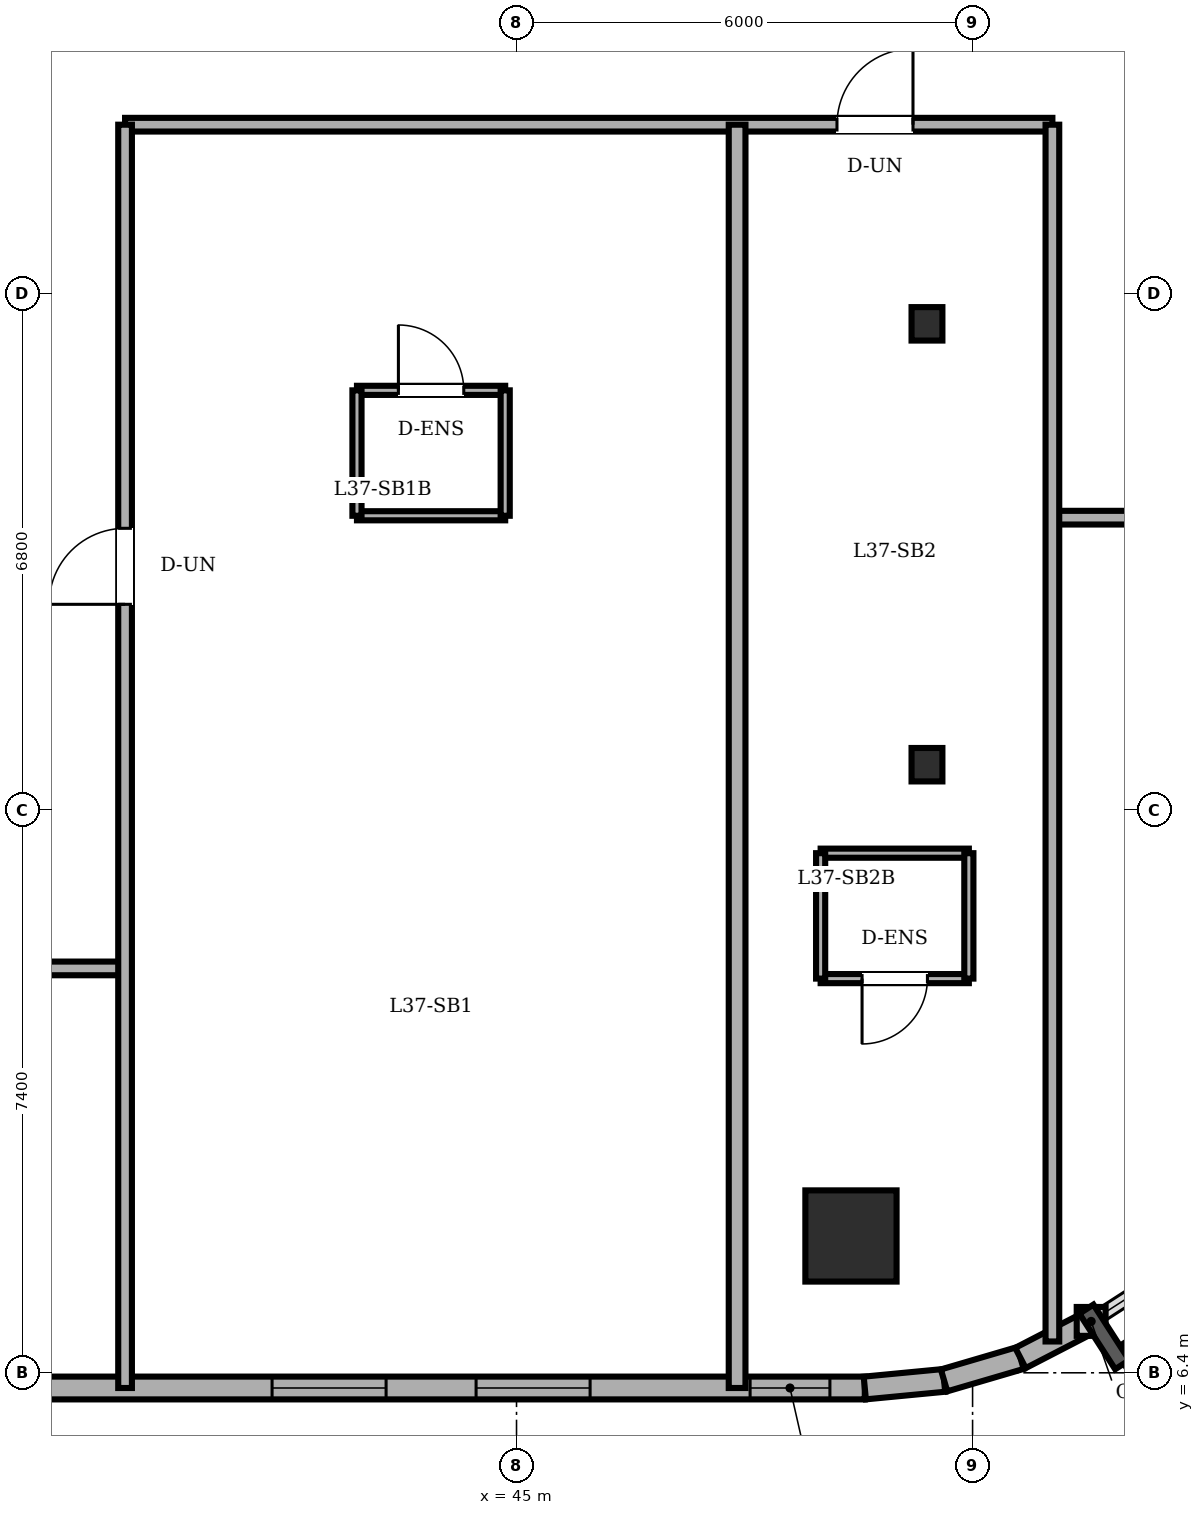
"""IFC4 building model, lengths in metres.
Left out: names, types, materials, properties, quantities, classifications, styles, units other than length and angle.
Written with IfcOpenShell. Run it as: python <this file> out.ifc"""

import sys

from ifc_helpers import new_model, si_unit, direction, frame, frame_2d, origin, origin_2d, place, context, subcontext, project, spatial, rectangle, circle, i_section, extrude, element, fill, save


model = new_model("IFC4")
c1 = context("Model", 3, precision=1e-05, world=origin(), true_north=direction((0.0, 1.0)))
c2 = subcontext(c1, "Body", "Model", "MODEL_VIEW")
j1 = project(units=[si_unit("LENGTHUNIT", "METRE"), si_unit("PLANEANGLEUNIT", "RADIAN")], contexts=[c1])
p1 = place(None, origin())
s1 = spatial("IfcSite", under=j1, at=p1, CompositionType="ELEMENT")
p2 = place(p1, origin())
s2 = spatial("IfcBuilding", under=s1, at=p2, CompositionType="ELEMENT")
p3 = place(p2, frame((0.0, 0.0, 143.8)))
s3 = spatial("IfcBuildingStorey", under=s2, at=p3, CompositionType="ELEMENT", Elevation=143.8)
p4 = place(p3, frame((49.4, 8.2, 0.0), z_axis=(0.0, 0.0, 1.0), x_axis=(1.0, 0.0, 0.0)))
e1 = element("IfcColumn", 1, at=p4, inside=s3, PredefinedType="COLUMN", context=c2, shape_type="SweptSolid", body=[
    extrude(circle(Radius=0.6, at=origin_2d()), origin(), (0.0, 0.0, 1.0), 3.6),
])
for number, where, z_axis, x_axis in (
    (2, (50.4, 14.4, 0.0), (0.0, 0.0, 1.0), (1.0, 0.0, 0.0)),
    (3, (50.4, 20.2, 0.0), (0.0, 0.0, 1.0), (1.0, 0.0, 0.0)),
):
    element("IfcColumn", number, at=place(p3, frame(where, z_axis=z_axis, x_axis=x_axis)), inside=s3, PredefinedType="COLUMN", context=c2, shape_type="SweptSolid", body=[
        extrude(i_section(OverallWidth=0.406, OverallDepth=0.44, WebThickness=0.024, FlangeThickness=0.039, FilletRadius=0.015, at=origin_2d()), origin(), (0.0, 0.0, 1.0), 3.6),
    ])
p5 = place(p3, frame((19.3, 6.2, 0.0), z_axis=(0.0, 0.0, 1.0), x_axis=(1.0, 0.0, 0.0)))
e4 = element("IfcWall", 4, at=p5, inside=s3, PredefinedType="SOLIDWALL", context=c2, shape_type="SweptSolid", body=[
    extrude(rectangle(XDim=30.282, YDim=0.3, at=frame_2d((15.141, 0.0))), origin(), (0.0, 0.0, 1.0), 3.4),
])
p6 = place(p5, frame((7.075, 0.0, 0.0)))
e5 = element("IfcOpeningElement", 5, at=p6, cuts=e4, PredefinedType="OPENING", context=c2, shape_type="SweptSolid", body=[
    extrude(rectangle(XDim=0.95, YDim=2.2, at=frame_2d((0.475, 1.1))), frame((0.0, 0.16, 0.0), z_axis=(0.0, -1.0, 0.0), x_axis=(1.0, 0.0, 0.0)), (0.0, 0.0, 1.0), 0.32),
])
p7 = place(p5, frame((1.25, 0.0, 0.85)))
e6 = element("IfcOpeningElement", 6, at=p7, cuts=e4, PredefinedType="OPENING", context=c2, shape_type="SweptSolid", body=[
    extrude(rectangle(XDim=1.5, YDim=1.55, at=frame_2d((0.75, 0.775))), frame((0.0, 0.16, 0.0), z_axis=(0.0, -1.0, 0.0), x_axis=(1.0, 0.0, 0.0)), (0.0, 0.0, 1.0), 0.32),
])
p8 = place(p5, frame((2.9, 0.0, 0.85)))
e7 = element("IfcOpeningElement", 7, at=p8, cuts=e4, PredefinedType="OPENING", context=c2, shape_type="SweptSolid", body=[
    extrude(rectangle(XDim=1.5, YDim=1.55, at=frame_2d((0.75, 0.775))), frame((0.0, 0.16, 0.0), z_axis=(0.0, -1.0, 0.0), x_axis=(1.0, 0.0, 0.0)), (0.0, 0.0, 1.0), 0.32),
])
p9 = place(p5, frame((12.167, 0.0, 0.85)))
e8 = element("IfcOpeningElement", 8, at=p9, cuts=e4, PredefinedType="OPENING", context=c2, shape_type="SweptSolid", body=[
    extrude(rectangle(XDim=1.5, YDim=1.55, at=frame_2d((0.75, 0.775))), frame((0.0, 0.16, 0.0), z_axis=(0.0, -1.0, 0.0), x_axis=(1.0, 0.0, 0.0)), (0.0, 0.0, 1.0), 0.32),
])
p10 = place(p5, frame((15.983, 0.0, 0.85)))
e9 = element("IfcOpeningElement", 9, at=p10, cuts=e4, PredefinedType="OPENING", context=c2, shape_type="SweptSolid", body=[
    extrude(rectangle(XDim=1.5, YDim=1.55, at=frame_2d((0.75, 0.775))), frame((0.0, 0.16, 0.0), z_axis=(0.0, -1.0, 0.0), x_axis=(1.0, 0.0, 0.0)), (0.0, 0.0, 1.0), 0.32),
])
p11 = place(p5, frame((22.484, 0.0, 0.85)))
e10 = element("IfcOpeningElement", 10, at=p11, cuts=e4, PredefinedType="OPENING", context=c2, shape_type="SweptSolid", body=[
    extrude(rectangle(XDim=1.5, YDim=1.55, at=frame_2d((0.75, 0.775))), frame((0.0, 0.16, 0.0), z_axis=(0.0, -1.0, 0.0), x_axis=(1.0, 0.0, 0.0)), (0.0, 0.0, 1.0), 0.32),
])
p12 = place(p5, frame((25.168, 0.0, 0.85)))
e11 = element("IfcOpeningElement", 11, at=p12, cuts=e4, PredefinedType="OPENING", context=c2, shape_type="SweptSolid", body=[
    extrude(rectangle(XDim=1.5, YDim=1.55, at=frame_2d((0.75, 0.775))), frame((0.0, 0.16, 0.0), z_axis=(0.0, -1.0, 0.0), x_axis=(1.0, 0.0, 0.0)), (0.0, 0.0, 1.0), 0.32),
])
p13 = place(p5, frame((28.773, 0.0, 0.85)))
e12 = element("IfcOpeningElement", 12, at=p13, cuts=e4, PredefinedType="OPENING", context=c2, shape_type="SweptSolid", body=[
    extrude(rectangle(XDim=1.05, YDim=1.55, at=frame_2d((0.525, 0.775))), frame((0.0, 0.16, 0.0), z_axis=(0.0, -1.0, 0.0), x_axis=(1.0, 0.0, 0.0)), (0.0, 0.0, 1.0), 0.32),
])
p14 = place(p3, frame((49.582, 6.2, 0.0), z_axis=(0.0, 0.0, 1.0), x_axis=(0.995426089968, 0.095534807324, 0.0)))
e13 = element("IfcWall", 13, at=p14, inside=s3, PredefinedType="SOLIDWALL", context=c2, shape_type="SweptSolid", body=[
    extrude(rectangle(XDim=1.048, YDim=0.3, at=frame_2d((0.524, 0.0))), origin(), (0.0, 0.0, 1.0), 3.4),
])
p15 = place(p3, frame((50.625, 6.3, 0.0), z_axis=(0.0, 0.0, 1.0), x_axis=(0.959528674476, 0.281610942363, 0.0)))
e14 = element("IfcWall", 14, at=p15, inside=s3, PredefinedType="SOLIDWALL", context=c2, shape_type="SweptSolid", body=[
    extrude(rectangle(XDim=1.047, YDim=0.3, at=frame_2d((0.524, 0.0))), origin(), (0.0, 0.0, 1.0), 3.4),
])
p16 = place(p3, frame((51.63, 6.595, 0.0), z_axis=(0.0, 0.0, 1.0), x_axis=(0.888283247196, 0.459296062198, 0.0)))
e15 = element("IfcWall", 15, at=p16, inside=s3, PredefinedType="SOLIDWALL", context=c2, shape_type="SweptSolid", body=[
    extrude(rectangle(XDim=1.047, YDim=0.3, at=frame_2d((0.523, 0.0))), origin(), (0.0, 0.0, 1.0), 3.4),
])
p17 = place(p3, frame((42.901, 19.325, 0.0), z_axis=(0.0, 0.0, 1.0), x_axis=(1.0, 0.0, 0.0)))
e16 = element("IfcWall", 16, at=p17, inside=s3, PredefinedType="PARTITIONING", context=c2, shape_type="SweptSolid", body=[
    extrude(rectangle(XDim=1.95, YDim=0.12, at=frame_2d((0.975, 0.0))), origin(), (0.0, 0.0, 1.0), 3.4),
])
p18 = place(p17, frame((0.545, 0.0, 0.0)))
e17 = element("IfcOpeningElement", 17, at=p18, cuts=e16, PredefinedType="OPENING", context=c2, shape_type="SweptSolid", body=[
    extrude(rectangle(XDim=0.86, YDim=2.1, at=frame_2d((0.43, 1.05))), frame((0.0, 0.07, 0.0), z_axis=(0.0, -1.0, 0.0), x_axis=(1.0, 0.0, 0.0)), (0.0, 0.0, 1.0), 0.14),
])
p19 = place(p3, frame((44.851, 17.675, 0.0), z_axis=(0.0, 0.0, 1.0), x_axis=(-1.0, 0.0, 0.0)))
e18 = element("IfcWall", 18, at=p19, inside=s3, PredefinedType="PARTITIONING", context=c2, shape_type="SweptSolid", body=[
    extrude(rectangle(XDim=1.95, YDim=0.12, at=frame_2d((0.975, 0.0))), origin(), (0.0, 0.0, 1.0), 3.4),
])
for number, where, z_axis, x_axis in (
    (19, (42.901, 19.325, 0.0), (0.0, 0.0, 1.0), (0.0, -1.0, 0.0)),
    (20, (44.851, 17.675, 0.0), (0.0, 0.0, 1.0), (0.0, 1.0, 0.0)),
):
    element("IfcWall", number, at=place(p3, frame(where, z_axis=z_axis, x_axis=x_axis)), inside=s3, PredefinedType="PARTITIONING", context=c2, shape_type="SweptSolid", body=[
        extrude(rectangle(XDim=1.65, YDim=0.12, at=frame_2d((0.825, 0.0))), origin(), (0.0, 0.0, 1.0), 3.4),
    ])
p20 = place(p3, frame((49.001, 13.236, 0.0), z_axis=(0.0, 0.0, 1.0), x_axis=(1.0, 0.0, 0.0)))
e21 = element("IfcWall", 21, at=p20, inside=s3, PredefinedType="PARTITIONING", context=c2, shape_type="SweptSolid", body=[
    extrude(rectangle(XDim=1.95, YDim=0.12, at=frame_2d((0.975, 0.0))), origin(), (0.0, 0.0, 1.0), 3.4),
])
p21 = place(p3, frame((50.951, 11.586, 0.0), z_axis=(0.0, 0.0, 1.0), x_axis=(-1.0, 0.0, 0.0)))
e22 = element("IfcWall", 22, at=p21, inside=s3, PredefinedType="PARTITIONING", context=c2, shape_type="SweptSolid", body=[
    extrude(rectangle(XDim=1.95, YDim=0.12, at=frame_2d((0.975, 0.0))), origin(), (0.0, 0.0, 1.0), 3.4),
])
p22 = place(p21, frame((0.545, 0.0, 0.0)))
e23 = element("IfcOpeningElement", 23, at=p22, cuts=e22, PredefinedType="OPENING", context=c2, shape_type="SweptSolid", body=[
    extrude(rectangle(XDim=0.86, YDim=2.1, at=frame_2d((0.43, 1.05))), frame((0.0, 0.07, 0.0), z_axis=(0.0, -1.0, 0.0), x_axis=(1.0, 0.0, 0.0)), (0.0, 0.0, 1.0), 0.14),
])
for number, where, z_axis, x_axis in (
    (24, (49.001, 13.236, 0.0), (0.0, 0.0, 1.0), (0.0, -1.0, 0.0)),
    (25, (50.951, 11.586, 0.0), (0.0, 0.0, 1.0), (0.0, 1.0, 0.0)),
):
    element("IfcWall", number, at=place(p3, frame(where, z_axis=z_axis, x_axis=x_axis)), inside=s3, PredefinedType="PARTITIONING", context=c2, shape_type="SweptSolid", body=[
        extrude(rectangle(XDim=1.65, YDim=0.12, at=frame_2d((0.825, 0.0))), origin(), (0.0, 0.0, 1.0), 3.4),
    ])
p23 = place(p3, frame((13.8, 11.72, 0.0), z_axis=(0.0, 0.0, 1.0), x_axis=(1.0, 0.0, 0.0)))
e26 = element("IfcWall", 26, at=p23, inside=s3, PredefinedType="PARTITIONING", context=c2, shape_type="SweptSolid", body=[
    extrude(rectangle(XDim=26.05, YDim=0.18, at=frame_2d((13.025, 0.0))), origin(), (0.0, 0.0, 1.0), 3.4),
])
p24 = place(p23, frame((12.24, 0.0, 0.0)))
e27 = element("IfcOpeningElement", 27, at=p24, cuts=e26, PredefinedType="OPENING", context=c2, shape_type="SweptSolid", body=[
    extrude(rectangle(XDim=0.92, YDim=2.1, at=frame_2d((0.46, 1.05))), frame((0.0, 0.1, 0.0), z_axis=(0.0, -1.0, 0.0), x_axis=(1.0, 0.0, 0.0)), (0.0, 0.0, 1.0), 0.2),
])
p25 = place(p23, frame((5.54, 0.0, 0.0)))
e28 = element("IfcOpeningElement", 28, at=p25, cuts=e26, PredefinedType="OPENING", context=c2, shape_type="SweptSolid", body=[
    extrude(rectangle(XDim=0.92, YDim=2.1, at=frame_2d((0.46, 1.05))), frame((0.0, 0.1, 0.0), z_axis=(0.0, -1.0, 0.0), x_axis=(1.0, 0.0, 0.0)), (0.0, 0.0, 1.0), 0.2),
])
p26 = place(p23, frame((19.605, 0.0, 0.0)))
e29 = element("IfcOpeningElement", 29, at=p26, cuts=e26, PredefinedType="OPENING", context=c2, shape_type="SweptSolid", body=[
    extrude(rectangle(XDim=0.92, YDim=2.1, at=frame_2d((0.46, 1.05))), frame((0.0, 0.1, 0.0), z_axis=(0.0, -1.0, 0.0), x_axis=(1.0, 0.0, 0.0)), (0.0, 0.0, 1.0), 0.2),
])
p27 = place(p3, frame((52.05, 17.65, 0.0), z_axis=(0.0, 0.0, 1.0), x_axis=(1.0, 0.0, 0.0)))
e30 = element("IfcWall", 30, at=p27, inside=s3, PredefinedType="PARTITIONING", context=c2, shape_type="SweptSolid", body=[
    extrude(rectangle(XDim=10.95, YDim=0.18, at=frame_2d((5.475, 0.0))), origin(), (0.0, 0.0, 1.0), 3.4),
])
p28 = place(p27, frame((0.975, 0.0, 0.0)))
e31 = element("IfcOpeningElement", 31, at=p28, cuts=e30, PredefinedType="OPENING", context=c2, shape_type="SweptSolid", body=[
    extrude(rectangle(XDim=0.92, YDim=2.1, at=frame_2d((0.46, 1.05))), frame((0.0, 0.1, 0.0), z_axis=(0.0, -1.0, 0.0), x_axis=(1.0, 0.0, 0.0)), (0.0, 0.0, 1.0), 0.2),
])
p29 = place(p3, frame((39.85, 22.82, 0.0), z_axis=(0.0, 0.0, 1.0), x_axis=(1.0, 0.0, 0.0)))
e32 = element("IfcWall", 32, at=p29, inside=s3, PredefinedType="PARTITIONING", context=c2, shape_type="SweptSolid", body=[
    extrude(rectangle(XDim=12.2, YDim=0.18, at=frame_2d((6.1, 0.0))), origin(), (0.0, 0.0, 1.0), 3.4),
])
p30 = place(p29, frame((9.366, 0.0, 0.0)))
e33 = element("IfcOpeningElement", 33, at=p30, cuts=e32, PredefinedType="OPENING", context=c2, shape_type="SweptSolid", body=[
    extrude(rectangle(XDim=1.0, YDim=2.15, at=frame_2d((0.5, 1.075))), frame((0.0, 0.1, 0.0), z_axis=(0.0, -1.0, 0.0), x_axis=(1.0, 0.0, 0.0)), (0.0, 0.0, 1.0), 0.2),
])
p31 = place(p3, frame((39.85, 6.2, 0.0), z_axis=(0.0, 0.0, 1.0), x_axis=(0.0, 1.0, 0.0)))
e34 = element("IfcWall", 34, at=p31, inside=s3, PredefinedType="PARTITIONING", context=c2, shape_type="SweptSolid", body=[
    extrude(rectangle(XDim=16.62, YDim=0.18, at=frame_2d((8.31, 0.0))), origin(), (0.0, 0.0, 1.0), 3.4),
])
p32 = place(p31, frame((10.31, 0.0, 0.0)))
e35 = element("IfcOpeningElement", 35, at=p32, cuts=e34, PredefinedType="OPENING", context=c2, shape_type="SweptSolid", body=[
    extrude(rectangle(XDim=1.0, YDim=2.15, at=frame_2d((0.5, 1.075))), frame((0.0, 0.1, 0.0), z_axis=(0.0, -1.0, 0.0), x_axis=(1.0, 0.0, 0.0)), (0.0, 0.0, 1.0), 0.2),
])
p33 = place(p3, frame((47.902, 6.2, 0.0), z_axis=(0.0, 0.0, 1.0), x_axis=(0.0, 1.0, 0.0)))
e36 = element("IfcWall", 36, at=p33, inside=s3, PredefinedType="PARTITIONING", context=c2, shape_type="SweptSolid", body=[
    extrude(rectangle(XDim=16.62, YDim=0.22, at=frame_2d((8.31, 0.0))), origin(), (0.0, 0.0, 1.0), 3.4),
])
p34 = place(p3, frame((52.05, 6.812, 0.0), z_axis=(0.0, 0.0, 1.0), x_axis=(0.0, 1.0, 0.0)))
e37 = element("IfcWall", 37, at=p34, inside=s3, PredefinedType="PARTITIONING", context=c2, shape_type="SweptSolid", body=[
    extrude(rectangle(XDim=16.008, YDim=0.18, at=frame_2d((8.004, 0.0))), origin(), (0.0, 0.0, 1.0), 3.4),
])
p35 = place(p11, origin())
e38 = element("IfcWindow", 38, at=p35, inside=s3, PartitioningType="DOUBLE_PANEL_VERTICAL", PredefinedType="WINDOW", context=c2, shape_type="SweptSolid", body=[
    extrude(rectangle(XDim=1.5, YDim=1.55, at=frame_2d((0.75, 0.775))), frame((0.0, 0.03, 0.0), z_axis=(0.0, -1.0, 0.0), x_axis=(1.0, 0.0, 0.0)), (0.0, 0.0, 1.0), 0.06),
])
fill(e10, e38)
p36 = place(p12, origin())
e39 = element("IfcWindow", 39, at=p36, inside=s3, PartitioningType="DOUBLE_PANEL_VERTICAL", PredefinedType="WINDOW", context=c2, shape_type="SweptSolid", body=[
    extrude(rectangle(XDim=1.5, YDim=1.55, at=frame_2d((0.75, 0.775))), frame((0.0, 0.03, 0.0), z_axis=(0.0, -1.0, 0.0), x_axis=(1.0, 0.0, 0.0)), (0.0, 0.0, 1.0), 0.06),
])
fill(e11, e39)
p37 = place(p13, origin())
e40 = element("IfcWindow", 40, at=p37, inside=s3, PartitioningType="SINGLE_PANEL", PredefinedType="WINDOW", context=c2, shape_type="SweptSolid", body=[
    extrude(rectangle(XDim=1.05, YDim=1.55, at=frame_2d((0.525, 0.775))), frame((0.0, 0.03, 0.0), z_axis=(0.0, -1.0, 0.0), x_axis=(1.0, 0.0, 0.0)), (0.0, 0.0, 1.0), 0.06),
])
fill(e12, e40)
p38 = place(p18, origin())
e41 = element("IfcDoor", 41, at=p38, inside=s3, OperationType="SINGLE_SWING_LEFT", PredefinedType="DOOR", context=c2, shape_type="SweptSolid", body=[
    extrude(rectangle(XDim=0.86, YDim=2.1, at=frame_2d((0.43, 1.05))), frame((0.0, 0.025, 0.0), z_axis=(0.0, -1.0, 0.0), x_axis=(1.0, 0.0, 0.0)), (0.0, 0.0, 1.0), 0.05),
])
fill(e17, e41)
p39 = place(p22, origin())
e42 = element("IfcDoor", 42, at=p39, inside=s3, OperationType="SINGLE_SWING_RIGHT", PredefinedType="DOOR", context=c2, shape_type="SweptSolid", body=[
    extrude(rectangle(XDim=0.86, YDim=2.1, at=frame_2d((0.43, 1.05))), frame((0.0, 0.025, 0.0), z_axis=(0.0, -1.0, 0.0), x_axis=(1.0, 0.0, 0.0)), (0.0, 0.0, 1.0), 0.05),
])
fill(e23, e42)
p40 = place(p32, origin())
e43 = element("IfcDoor", 43, at=p40, inside=s3, OperationType="SINGLE_SWING_LEFT", PredefinedType="DOOR", context=c2, shape_type="SweptSolid", body=[
    extrude(rectangle(XDim=1.0, YDim=2.15, at=frame_2d((0.5, 1.075))), frame((0.0, 0.025, 0.0), z_axis=(0.0, -1.0, 0.0), x_axis=(1.0, 0.0, 0.0)), (0.0, 0.0, 1.0), 0.05),
])
fill(e35, e43)
p41 = place(p30, origin())
e44 = element("IfcDoor", 44, at=p41, inside=s3, OperationType="SINGLE_SWING_RIGHT", PredefinedType="DOOR", context=c2, shape_type="SweptSolid", body=[
    extrude(rectangle(XDim=1.0, YDim=2.15, at=frame_2d((0.5, 1.075))), frame((0.0, 0.025, 0.0), z_axis=(0.0, -1.0, 0.0), x_axis=(1.0, 0.0, 0.0)), (0.0, 0.0, 1.0), 0.05),
])
fill(e33, e44)
save(model, sys.argv[1])
